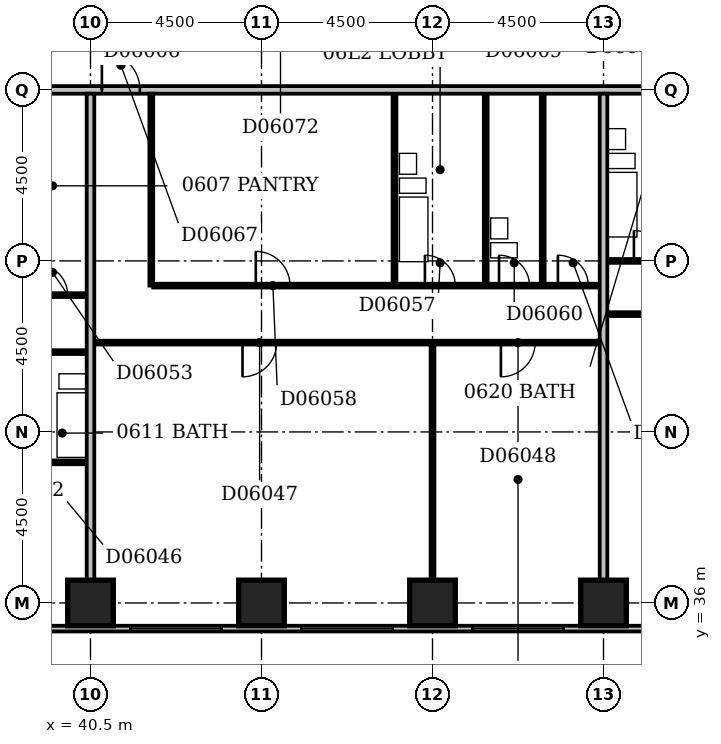
"""IFC4 building model, lengths in metres.
Left out: names, types, materials, properties, quantities, classifications, styles, units other than length and angle.
Written with IfcOpenShell. Run it as: python <this file> out.ifc"""

import sys

from ifc_helpers import new_model, si_unit, direction, frame, frame_2d, origin, origin_2d, place, context, subcontext, project, spatial, rectangle, extrude, element, fill, save


model = new_model("IFC4")
c1 = context("Model", 3, precision=1e-05, world=origin(), true_north=direction((0.0, 1.0)))
c2 = subcontext(c1, "Body", "Model", "MODEL_VIEW")
j1 = project(units=[si_unit("LENGTHUNIT", "METRE"), si_unit("PLANEANGLEUNIT", "RADIAN")], contexts=[c1])
p1 = place(None, origin())
s1 = spatial("IfcSite", under=j1, at=p1, CompositionType="ELEMENT")
p2 = place(p1, origin())
s2 = spatial("IfcBuilding", under=s1, at=p2, CompositionType="ELEMENT")
p3 = place(p2, frame((0.0, 0.0, 32.6)))
s3 = spatial("IfcBuildingStorey", under=s2, at=p3, CompositionType="ELEMENT", Elevation=32.6)
for number, where, z_axis, x_axis in (
    (1, (40.5, 36.0, -0.3), (0.0, 0.0, 1.0), (1.0, 0.0, 0.0)),
    (2, (45.0, 36.0, -0.3), (0.0, 0.0, 1.0), (1.0, 0.0, 0.0)),
    (3, (49.5, 36.0, -0.3), (0.0, 0.0, 1.0), (1.0, 0.0, 0.0)),
    (4, (54.0, 36.0, -0.3), (0.0, 0.0, 1.0), (1.0, 0.0, 0.0)),
):
    element("IfcColumn", number, at=place(p3, frame(where, z_axis=z_axis, x_axis=x_axis)), inside=s3, PredefinedType="COLUMN", context=c2, shape_type="SweptSolid", body=[
        extrude(rectangle(XDim=1.2, YDim=1.2, at=origin_2d()), origin(), (0.0, 0.0, 1.0), 3.6),
    ])
p4 = place(p3, frame((23.1, 35.325, 0.0), z_axis=(0.0, 0.0, 1.0), x_axis=(1.0, 0.0, 0.0)))
e5 = element("IfcWall", 5, at=p4, inside=s3, PredefinedType="STANDARD", context=c2, shape_type="SweptSolid", body=[
    extrude(rectangle(XDim=45.15, YDim=0.15, at=frame_2d((22.575, 0.0))), origin(), (0.0, 0.0, 1.0), 2.7),
])
p5 = place(p4, frame((0.45, 0.0, 0.6)))
e6 = element("IfcOpeningElement", 6, at=p5, cuts=e5, PredefinedType="OPENING", context=c2, shape_type="SweptSolid", body=[
    extrude(rectangle(XDim=2.4, YDim=1.8, at=frame_2d((1.2, 0.9))), frame((0.0, 0.087, 0.0), z_axis=(0.0, -1.0, 0.0), x_axis=(1.0, 0.0, 0.0)), (0.0, 0.0, 1.0), 0.174),
])
p6 = place(p4, frame((4.95, 0.0, 0.6)))
e7 = element("IfcOpeningElement", 7, at=p6, cuts=e5, PredefinedType="OPENING", context=c2, shape_type="SweptSolid", body=[
    extrude(rectangle(XDim=2.4, YDim=1.8, at=frame_2d((1.2, 0.9))), frame((0.0, 0.087, 0.0), z_axis=(0.0, -1.0, 0.0), x_axis=(1.0, 0.0, 0.0)), (0.0, 0.0, 1.0), 0.174),
])
p7 = place(p4, frame((10.583, 0.0, 0.6)))
e8 = element("IfcOpeningElement", 8, at=p7, cuts=e5, PredefinedType="OPENING", context=c2, shape_type="SweptSolid", body=[
    extrude(rectangle(XDim=1.5, YDim=1.8, at=frame_2d((0.75, 0.9))), frame((0.0, 0.087, 0.0), z_axis=(0.0, -1.0, 0.0), x_axis=(1.0, 0.0, 0.0)), (0.0, 0.0, 1.0), 0.174),
])
p8 = place(p4, frame((13.83, 0.0, 0.6)))
e9 = element("IfcOpeningElement", 9, at=p8, cuts=e5, PredefinedType="OPENING", context=c2, shape_type="SweptSolid", body=[
    extrude(rectangle(XDim=1.5, YDim=1.8, at=frame_2d((0.75, 0.9))), frame((0.0, 0.087, 0.0), z_axis=(0.0, -1.0, 0.0), x_axis=(1.0, 0.0, 0.0)), (0.0, 0.0, 1.0), 0.174),
])
p9 = place(p4, frame((18.45, 0.0, 0.6)))
e10 = element("IfcOpeningElement", 10, at=p9, cuts=e5, PredefinedType="OPENING", context=c2, shape_type="SweptSolid", body=[
    extrude(rectangle(XDim=2.4, YDim=1.8, at=frame_2d((1.2, 0.9))), frame((0.0, 0.087, 0.0), z_axis=(0.0, -1.0, 0.0), x_axis=(1.0, 0.0, 0.0)), (0.0, 0.0, 1.0), 0.174),
])
p10 = place(p4, frame((22.95, 0.0, 0.6)))
e11 = element("IfcOpeningElement", 11, at=p10, cuts=e5, PredefinedType="OPENING", context=c2, shape_type="SweptSolid", body=[
    extrude(rectangle(XDim=2.4, YDim=1.8, at=frame_2d((1.2, 0.9))), frame((0.0, 0.087, 0.0), z_axis=(0.0, -1.0, 0.0), x_axis=(1.0, 0.0, 0.0)), (0.0, 0.0, 1.0), 0.174),
])
p11 = place(p4, frame((27.45, 0.0, 0.6)))
e12 = element("IfcOpeningElement", 12, at=p11, cuts=e5, PredefinedType="OPENING", context=c2, shape_type="SweptSolid", body=[
    extrude(rectangle(XDim=2.4, YDim=1.8, at=frame_2d((1.2, 0.9))), frame((0.0, 0.087, 0.0), z_axis=(0.0, -1.0, 0.0), x_axis=(1.0, 0.0, 0.0)), (0.0, 0.0, 1.0), 0.174),
])
p12 = place(p4, frame((31.95, 0.0, 0.6)))
e13 = element("IfcOpeningElement", 13, at=p12, cuts=e5, PredefinedType="OPENING", context=c2, shape_type="SweptSolid", body=[
    extrude(rectangle(XDim=2.4, YDim=1.8, at=frame_2d((1.2, 0.9))), frame((0.0, 0.087, 0.0), z_axis=(0.0, -1.0, 0.0), x_axis=(1.0, 0.0, 0.0)), (0.0, 0.0, 1.0), 0.174),
])
p13 = place(p4, frame((36.297, 0.0, 0.6)))
e14 = element("IfcOpeningElement", 14, at=p13, cuts=e5, PredefinedType="OPENING", context=c2, shape_type="SweptSolid", body=[
    extrude(rectangle(XDim=2.1, YDim=1.8, at=frame_2d((1.05, 0.9))), frame((0.0, 0.087, 0.0), z_axis=(0.0, -1.0, 0.0), x_axis=(1.0, 0.0, 0.0)), (0.0, 0.0, 1.0), 0.174),
])
p14 = place(p4, frame((40.95, 0.0, 0.6)))
e15 = element("IfcOpeningElement", 15, at=p14, cuts=e5, PredefinedType="OPENING", context=c2, shape_type="SweptSolid", body=[
    extrude(rectangle(XDim=2.4, YDim=1.8, at=frame_2d((1.2, 0.9))), frame((0.0, 0.087, 0.0), z_axis=(0.0, -1.0, 0.0), x_axis=(1.0, 0.0, 0.0)), (0.0, 0.0, 1.0), 0.174),
])
p15 = place(p3, frame((40.5, 36.6, 0.0), z_axis=(0.0, 0.0, 1.0), x_axis=(0.0, 1.0, 0.0)))
e16 = element("IfcWall", 16, at=p15, inside=s3, PredefinedType="PARTITIONING", context=c2, shape_type="SweptSolid", body=[
    extrude(rectangle(XDim=12.8, YDim=0.2, at=frame_2d((6.4, 0.0))), origin(), (0.0, 0.0, 1.0), 3.3),
])
p16 = place(p3, frame((49.5, 36.6, 0.0), z_axis=(0.0, 0.0, 1.0), x_axis=(0.0, 1.0, 0.0)))
e17 = element("IfcWall", 17, at=p16, inside=s3, PredefinedType="PARTITIONING", context=c2, shape_type="SweptSolid", body=[
    extrude(rectangle(XDim=6.2, YDim=0.1, at=frame_2d((3.1, 0.0))), origin(), (0.0, 0.0, 1.0), 3.3),
])
p17 = place(p3, frame((54.0, 36.6, 0.0), z_axis=(0.0, 0.0, 1.0), x_axis=(0.0, 1.0, 0.0)))
e18 = element("IfcWall", 18, at=p17, inside=s3, PredefinedType="PARTITIONING", context=c2, shape_type="SweptSolid", body=[
    extrude(rectangle(XDim=12.8, YDim=0.2, at=frame_2d((6.4, 0.0))), origin(), (0.0, 0.0, 1.0), 2.6),
])
p18 = place(p3, frame((38.25, 39.7, 0.0), z_axis=(0.0, 0.0, 1.0), x_axis=(1.0, 0.0, 0.0)))
e19 = element("IfcWall", 19, at=p18, inside=s3, PredefinedType="PLUMBINGWALL", context=c2, shape_type="SweptSolid", body=[
    extrude(rectangle(XDim=2.15, YDim=0.1, at=frame_2d((1.075, 0.0))), origin(), (0.0, 0.0, 1.0), 3.3),
])
p19 = place(p3, frame((22.6, 42.6, 0.0), z_axis=(0.0, 0.0, 1.0), x_axis=(1.0, 0.0, 0.0)))
e20 = element("IfcWall", 20, at=p19, inside=s3, PredefinedType="PARTITIONING", context=c2, shape_type="SweptSolid", body=[
    extrude(rectangle(XDim=17.8, YDim=0.1, at=frame_2d((8.9, 0.0))), origin(), (0.0, 0.0, 1.0), 3.3),
])
p20 = place(p19, frame((3.9, 0.0, 0.0)))
e21 = element("IfcOpeningElement", 21, at=p20, cuts=e20, PredefinedType="OPENING", context=c2, shape_type="SweptSolid", body=[
    extrude(rectangle(XDim=0.9, YDim=2.1, at=frame_2d((0.45, 1.05))), frame((0.0, 0.062, 0.0), z_axis=(0.0, -1.0, 0.0), x_axis=(1.0, 0.0, 0.0)), (0.0, 0.0, 1.0), 0.124),
])
p21 = place(p19, frame((10.7, 0.0, 0.0)))
e22 = element("IfcOpeningElement", 22, at=p21, cuts=e20, PredefinedType="OPENING", context=c2, shape_type="SweptSolid", body=[
    extrude(rectangle(XDim=0.9, YDim=2.1, at=frame_2d((0.45, 1.05))), frame((0.0, 0.062, 0.0), z_axis=(0.0, -1.0, 0.0), x_axis=(1.0, 0.0, 0.0)), (0.0, 0.0, 1.0), 0.124),
])
p22 = place(p19, frame((14.05, 0.0, 0.0)))
e23 = element("IfcOpeningElement", 23, at=p22, cuts=e20, PredefinedType="OPENING", context=c2, shape_type="SweptSolid", body=[
    extrude(rectangle(XDim=0.9, YDim=2.1, at=frame_2d((0.45, 1.05))), frame((0.0, 0.062, 0.0), z_axis=(0.0, -1.0, 0.0), x_axis=(1.0, 0.0, 0.0)), (0.0, 0.0, 1.0), 0.124),
])
p23 = place(p3, frame((40.6, 42.85, 0.0), z_axis=(0.0, 0.0, 1.0), x_axis=(1.0, 0.0, 0.0)))
e24 = element("IfcWall", 24, at=p23, inside=s3, PredefinedType="PARTITIONING", context=c2, shape_type="SweptSolid", body=[
    extrude(rectangle(XDim=13.3, YDim=0.1, at=frame_2d((6.65, 0.0))), origin(), (0.0, 0.0, 1.0), 3.3),
])
p24 = place(p23, frame((3.9, 0.0, 0.0)))
e25 = element("IfcOpeningElement", 25, at=p24, cuts=e24, PredefinedType="OPENING", context=c2, shape_type="SweptSolid", body=[
    extrude(rectangle(XDim=0.9, YDim=2.1, at=frame_2d((0.45, 1.05))), frame((0.0, 0.062, 0.0), z_axis=(0.0, -1.0, 0.0), x_axis=(1.0, 0.0, 0.0)), (0.0, 0.0, 1.0), 0.124),
])
p25 = place(p23, frame((10.7, 0.0, 0.0)))
e26 = element("IfcOpeningElement", 26, at=p25, cuts=e24, PredefinedType="OPENING", context=c2, shape_type="SweptSolid", body=[
    extrude(rectangle(XDim=0.9, YDim=2.1, at=frame_2d((0.45, 1.05))), frame((0.0, 0.062, 0.0), z_axis=(0.0, -1.0, 0.0), x_axis=(1.0, 0.0, 0.0)), (0.0, 0.0, 1.0), 0.124),
])
p26 = place(p3, frame((54.1, 43.6, 0.0), z_axis=(0.0, 0.0, 1.0), x_axis=(1.0, 0.0, 0.0)))
e27 = element("IfcWall", 27, at=p26, inside=s3, PredefinedType="PARTITIONING", context=c2, shape_type="SweptSolid", body=[
    extrude(rectangle(XDim=8.8, YDim=0.1, at=frame_2d((4.4, 0.0))), origin(), (0.0, 0.0, 1.0), 3.3),
])
p27 = place(p26, frame((1.7, 0.0, 0.0)))
e28 = element("IfcOpeningElement", 28, at=p27, cuts=e27, PredefinedType="OPENING", context=c2, shape_type="SweptSolid", body=[
    extrude(rectangle(XDim=0.9, YDim=2.1, at=frame_2d((0.45, 1.05))), frame((0.0, 0.062, 0.0), z_axis=(0.0, -1.0, 0.0), x_axis=(1.0, 0.0, 0.0)), (0.0, 0.0, 1.0), 0.124),
])
p28 = place(p26, frame((6.2, 0.0, 0.0)))
e29 = element("IfcOpeningElement", 29, at=p28, cuts=e27, PredefinedType="OPENING", context=c2, shape_type="SweptSolid", body=[
    extrude(rectangle(XDim=0.9, YDim=2.1, at=frame_2d((0.45, 1.05))), frame((0.0, 0.062, 0.0), z_axis=(0.0, -1.0, 0.0), x_axis=(1.0, 0.0, 0.0)), (0.0, 0.0, 1.0), 0.124),
])
p29 = place(p3, frame((31.05, 44.1, 0.0), z_axis=(0.0, 0.0, 1.0), x_axis=(1.0, 0.0, 0.0)))
e30 = element("IfcWall", 30, at=p29, inside=s3, PredefinedType="PARTITIONING", context=c2, shape_type="SweptSolid", body=[
    extrude(rectangle(XDim=9.35, YDim=0.1, at=frame_2d((4.675, 0.0))), origin(), (0.0, 0.0, 1.0), 3.3),
])
p30 = place(p29, frame((0.75, 0.0, 0.0)))
e31 = element("IfcOpeningElement", 31, at=p30, cuts=e30, PredefinedType="OPENING", context=c2, shape_type="SweptSolid", body=[
    extrude(rectangle(XDim=0.8, YDim=2.1, at=frame_2d((0.4, 1.05))), frame((0.0, 0.062, 0.0), z_axis=(0.0, -1.0, 0.0), x_axis=(1.0, 0.0, 0.0)), (0.0, 0.0, 1.0), 0.124),
])
p31 = place(p29, frame((8.05, 0.0, 0.0)))
e32 = element("IfcOpeningElement", 32, at=p31, cuts=e30, PredefinedType="OPENING", context=c2, shape_type="SweptSolid", body=[
    extrude(rectangle(XDim=0.8, YDim=2.1, at=frame_2d((0.4, 1.05))), frame((0.0, 0.062, 0.0), z_axis=(0.0, -1.0, 0.0), x_axis=(1.0, 0.0, 0.0)), (0.0, 0.0, 1.0), 0.124),
])
p32 = place(p29, frame((4.25, 0.0, 0.0)))
e33 = element("IfcOpeningElement", 33, at=p32, cuts=e30, PredefinedType="OPENING", context=c2, shape_type="SweptSolid", body=[
    extrude(rectangle(XDim=0.8, YDim=2.1, at=frame_2d((0.4, 1.05))), frame((0.0, 0.062, 0.0), z_axis=(0.0, -1.0, 0.0), x_axis=(1.0, 0.0, 0.0)), (0.0, 0.0, 1.0), 0.124),
])
p33 = place(p29, frame((6.05, 0.0, 0.0)))
e34 = element("IfcOpeningElement", 34, at=p33, cuts=e30, PredefinedType="OPENING", context=c2, shape_type="SweptSolid", body=[
    extrude(rectangle(XDim=0.8, YDim=2.1, at=frame_2d((0.4, 1.05))), frame((0.0, 0.062, 0.0), z_axis=(0.0, -1.0, 0.0), x_axis=(1.0, 0.0, 0.0)), (0.0, 0.0, 1.0), 0.124),
])
p34 = place(p29, frame((2.7, 0.0, 0.0)))
e35 = element("IfcOpeningElement", 35, at=p34, cuts=e30, PredefinedType="OPENING", context=c2, shape_type="SweptSolid", body=[
    extrude(rectangle(XDim=0.8, YDim=2.1, at=frame_2d((0.4, 1.05))), frame((0.0, 0.062, 0.0), z_axis=(0.0, -1.0, 0.0), x_axis=(1.0, 0.0, 0.0)), (0.0, 0.0, 1.0), 0.124),
])
p35 = place(p3, frame((42.1, 44.35, 0.0), z_axis=(0.0, 0.0, 1.0), x_axis=(0.0, 1.0, 0.0)))
e36 = element("IfcWall", 36, at=p35, inside=s3, PredefinedType="PARTITIONING", context=c2, shape_type="SweptSolid", body=[
    extrude(rectangle(XDim=5.05, YDim=0.1, at=frame_2d((2.525, 0.0))), origin(), (0.0, 0.0, 1.0), 3.3),
])
p36 = place(p3, frame((42.15, 44.35, 0.0), z_axis=(0.0, 0.0, 1.0), x_axis=(1.0, 0.0, 0.0)))
e37 = element("IfcWall", 37, at=p36, inside=s3, PredefinedType="PARTITIONING", context=c2, shape_type="SweptSolid", body=[
    extrude(rectangle(XDim=11.75, YDim=0.1, at=frame_2d((5.875, 0.0))), origin(), (0.0, 0.0, 1.0), 3.3),
])
p37 = place(p36, frame((7.15, 0.0, 0.0)))
e38 = element("IfcOpeningElement", 38, at=p37, cuts=e37, PredefinedType="OPENING", context=c2, shape_type="SweptSolid", body=[
    extrude(rectangle(XDim=0.8, YDim=2.1, at=frame_2d((0.4, 1.05))), frame((0.0, 0.062, 0.0), z_axis=(0.0, -1.0, 0.0), x_axis=(1.0, 0.0, 0.0)), (0.0, 0.0, 1.0), 0.124),
])
p38 = place(p36, frame((2.7, 0.0, 0.0)))
e39 = element("IfcOpeningElement", 39, at=p38, cuts=e37, PredefinedType="OPENING", context=c2, shape_type="SweptSolid", body=[
    extrude(rectangle(XDim=0.9, YDim=2.1, at=frame_2d((0.45, 1.05))), frame((0.0, 0.062, 0.0), z_axis=(0.0, -1.0, 0.0), x_axis=(1.0, 0.0, 0.0)), (0.0, 0.0, 1.0), 0.124),
])
p39 = place(p36, frame((10.65, 0.0, 0.0)))
e40 = element("IfcOpeningElement", 40, at=p39, cuts=e37, PredefinedType="OPENING", context=c2, shape_type="SweptSolid", body=[
    extrude(rectangle(XDim=0.8, YDim=2.1, at=frame_2d((0.4, 1.05))), frame((0.0, 0.062, 0.0), z_axis=(0.0, -1.0, 0.0), x_axis=(1.0, 0.0, 0.0)), (0.0, 0.0, 1.0), 0.124),
])
p40 = place(p36, frame((9.1, 0.0, 0.0)))
e41 = element("IfcOpeningElement", 41, at=p40, cuts=e37, PredefinedType="OPENING", context=c2, shape_type="SweptSolid", body=[
    extrude(rectangle(XDim=0.8, YDim=2.1, at=frame_2d((0.4, 1.05))), frame((0.0, 0.062, 0.0), z_axis=(0.0, -1.0, 0.0), x_axis=(1.0, 0.0, 0.0)), (0.0, 0.0, 1.0), 0.124),
])
for number, where, z_axis, x_axis in (
    (42, (48.5, 44.4, 0.0), (0.0, 0.0, 1.0), (0.0, 1.0, 0.0)),
    (43, (50.9, 44.4, 0.0), (0.0, 0.0, 1.0), (0.0, 1.0, 0.0)),
    (44, (52.4, 44.4, 0.0), (0.0, 0.0, 1.0), (0.0, 1.0, 0.0)),
):
    element("IfcWall", number, at=place(p3, frame(where, z_axis=z_axis, x_axis=x_axis)), inside=s3, PredefinedType="PLUMBINGWALL", context=c2, shape_type="SweptSolid", body=[
        extrude(rectangle(XDim=5.0, YDim=0.1, at=frame_2d((2.5, 0.0))), origin(), (0.0, 0.0, 1.0), 3.3),
    ])
p41 = place(p3, frame((54.1, 45.0, 0.0), z_axis=(0.0, 0.0, 1.0), x_axis=(1.0, 0.0, 0.0)))
e45 = element("IfcWall", 45, at=p41, inside=s3, PredefinedType="PARTITIONING", context=c2, shape_type="SweptSolid", body=[
    extrude(rectangle(XDim=2.25, YDim=0.1, at=frame_2d((1.125, 0.0))), origin(), (0.0, 0.0, 1.0), 3.3),
])
p42 = place(p41, frame((0.7, 0.0, 0.0)))
e46 = element("IfcOpeningElement", 46, at=p42, cuts=e45, PredefinedType="OPENING", context=c2, shape_type="SweptSolid", body=[
    extrude(rectangle(XDim=0.8, YDim=2.1, at=frame_2d((0.4, 1.05))), frame((0.0, 0.062, 0.0), z_axis=(0.0, -1.0, 0.0), x_axis=(1.0, 0.0, 0.0)), (0.0, 0.0, 1.0), 0.124),
])
p43 = place(p3, frame((9.1, 49.5, 0.0), z_axis=(0.0, 0.0, 1.0), x_axis=(1.0, 0.0, 0.0)))
e47 = element("IfcWall", 47, at=p43, inside=s3, PredefinedType="PARTITIONING", context=c2, shape_type="SweptSolid", body=[
    extrude(rectangle(XDim=57.8, YDim=0.2, at=frame_2d((28.9, 0.0))), origin(), (0.0, 0.0, 1.0), 3.3),
])
p44 = place(p43, frame((20.6, 0.0, 0.0)))
e48 = element("IfcOpeningElement", 48, at=p44, cuts=e47, PredefinedType="OPENING", context=c2, shape_type="SweptSolid", body=[
    extrude(rectangle(XDim=1.0, YDim=2.1, at=frame_2d((0.5, 1.05))), frame((0.0, 0.112, 0.0), z_axis=(0.0, -1.0, 0.0), x_axis=(1.0, 0.0, 0.0)), (0.0, 0.0, 1.0), 0.224),
])
p45 = place(p43, frame((31.7, 0.0, 0.0)))
e49 = element("IfcOpeningElement", 49, at=p45, cuts=e47, PredefinedType="OPENING", context=c2, shape_type="SweptSolid", body=[
    extrude(rectangle(XDim=1.0, YDim=2.1, at=frame_2d((0.5, 1.05))), frame((0.0, 0.112, 0.0), z_axis=(0.0, -1.0, 0.0), x_axis=(1.0, 0.0, 0.0)), (0.0, 0.0, 1.0), 0.224),
])
p46 = place(p43, frame((47.6, 0.0, 0.0)))
e50 = element("IfcOpeningElement", 50, at=p46, cuts=e47, PredefinedType="OPENING", context=c2, shape_type="SweptSolid", body=[
    extrude(rectangle(XDim=1.0, YDim=2.1, at=frame_2d((0.5, 1.05))), frame((0.0, 0.112, 0.0), z_axis=(0.0, -1.0, 0.0), x_axis=(1.0, 0.0, 0.0)), (0.0, 0.0, 1.0), 0.224),
])
p47 = place(p43, frame((54.15, 0.0, 0.0)))
e51 = element("IfcOpeningElement", 51, at=p47, cuts=e47, PredefinedType="OPENING", context=c2, shape_type="SweptSolid", body=[
    extrude(rectangle(XDim=1.0, YDim=2.1, at=frame_2d((0.5, 1.05))), frame((0.0, 0.112, 0.0), z_axis=(0.0, -1.0, 0.0), x_axis=(1.0, 0.0, 0.0)), (0.0, 0.0, 1.0), 0.224),
])
p48 = place(p43, frame((10.65, 0.0, 0.0)))
e52 = element("IfcOpeningElement", 52, at=p48, cuts=e47, PredefinedType="OPENING", context=c2, shape_type="SweptSolid", body=[
    extrude(rectangle(XDim=0.9, YDim=2.1, at=frame_2d((0.45, 1.05))), frame((0.0, 0.112, 0.0), z_axis=(0.0, -1.0, 0.0), x_axis=(1.0, 0.0, 0.0)), (0.0, 0.0, 1.0), 0.224),
])
p49 = place(p9, origin())
e53 = element("IfcWindow", 53, at=p49, inside=s3, PartitioningType="SINGLE_PANEL", PredefinedType="WINDOW", context=c2, shape_type="SweptSolid", body=[
    extrude(rectangle(XDim=2.4, YDim=1.8, at=frame_2d((1.2, 0.9))), frame((0.0, 0.03, 0.0), z_axis=(0.0, -1.0, 0.0), x_axis=(1.0, 0.0, 0.0)), (0.0, 0.0, 1.0), 0.06),
])
fill(e10, e53)
p50 = place(p10, origin())
e54 = element("IfcWindow", 54, at=p50, inside=s3, PartitioningType="SINGLE_PANEL", PredefinedType="WINDOW", context=c2, shape_type="SweptSolid", body=[
    extrude(rectangle(XDim=2.4, YDim=1.8, at=frame_2d((1.2, 0.9))), frame((0.0, 0.03, 0.0), z_axis=(0.0, -1.0, 0.0), x_axis=(1.0, 0.0, 0.0)), (0.0, 0.0, 1.0), 0.06),
])
fill(e11, e54)
p51 = place(p11, origin())
e55 = element("IfcWindow", 55, at=p51, inside=s3, PartitioningType="SINGLE_PANEL", PredefinedType="WINDOW", context=c2, shape_type="SweptSolid", body=[
    extrude(rectangle(XDim=2.4, YDim=1.8, at=frame_2d((1.2, 0.9))), frame((0.0, 0.03, 0.0), z_axis=(0.0, -1.0, 0.0), x_axis=(1.0, 0.0, 0.0)), (0.0, 0.0, 1.0), 0.06),
])
fill(e12, e55)
p52 = place(p24, frame((0.9, 0.0, 0.0), z_axis=(0.0, 0.0, 1.0), x_axis=(-1.0, 0.0, 0.0)))
e56 = element("IfcDoor", 56, at=p52, inside=s3, OperationType="SINGLE_SWING_RIGHT", PredefinedType="DOOR", context=c2, shape_type="SweptSolid", body=[
    extrude(rectangle(XDim=0.9, YDim=2.1, at=frame_2d((0.45, 1.05))), frame((0.0, 0.025, 0.0), z_axis=(0.0, -1.0, 0.0), x_axis=(1.0, 0.0, 0.0)), (0.0, 0.0, 1.0), 0.05),
])
fill(e25, e56)
p53 = place(p25, frame((0.9, 0.0, 0.0), z_axis=(0.0, 0.0, 1.0), x_axis=(-1.0, 0.0, 0.0)))
e57 = element("IfcDoor", 57, at=p53, inside=s3, OperationType="SINGLE_SWING_RIGHT", PredefinedType="DOOR", context=c2, shape_type="SweptSolid", body=[
    extrude(rectangle(XDim=0.9, YDim=2.1, at=frame_2d((0.45, 1.05))), frame((0.0, 0.025, 0.0), z_axis=(0.0, -1.0, 0.0), x_axis=(1.0, 0.0, 0.0)), (0.0, 0.0, 1.0), 0.05),
])
fill(e26, e57)
p54 = place(p31, origin())
e58 = element("IfcDoor", 58, at=p54, inside=s3, OperationType="SINGLE_SWING_LEFT", PredefinedType="DOOR", context=c2, shape_type="SweptSolid", body=[
    extrude(rectangle(XDim=0.8, YDim=2.1, at=frame_2d((0.4, 1.05))), frame((0.0, 0.025, 0.0), z_axis=(0.0, -1.0, 0.0), x_axis=(1.0, 0.0, 0.0)), (0.0, 0.0, 1.0), 0.05),
])
fill(e32, e58)
p55 = place(p37, origin())
e59 = element("IfcDoor", 59, at=p55, inside=s3, OperationType="SINGLE_SWING_LEFT", PredefinedType="DOOR", context=c2, shape_type="SweptSolid", body=[
    extrude(rectangle(XDim=0.8, YDim=2.1, at=frame_2d((0.4, 1.05))), frame((0.0, 0.025, 0.0), z_axis=(0.0, -1.0, 0.0), x_axis=(1.0, 0.0, 0.0)), (0.0, 0.0, 1.0), 0.05),
])
fill(e38, e59)
p56 = place(p38, origin())
e60 = element("IfcDoor", 60, at=p56, inside=s3, OperationType="SINGLE_SWING_LEFT", PredefinedType="DOOR", context=c2, shape_type="SweptSolid", body=[
    extrude(rectangle(XDim=0.9, YDim=2.1, at=frame_2d((0.45, 1.05))), frame((0.0, 0.025, 0.0), z_axis=(0.0, -1.0, 0.0), x_axis=(1.0, 0.0, 0.0)), (0.0, 0.0, 1.0), 0.05),
])
fill(e39, e60)
p57 = place(p39, origin())
e61 = element("IfcDoor", 61, at=p57, inside=s3, OperationType="SINGLE_SWING_LEFT", PredefinedType="DOOR", context=c2, shape_type="SweptSolid", body=[
    extrude(rectangle(XDim=0.8, YDim=2.1, at=frame_2d((0.4, 1.05))), frame((0.0, 0.025, 0.0), z_axis=(0.0, -1.0, 0.0), x_axis=(1.0, 0.0, 0.0)), (0.0, 0.0, 1.0), 0.05),
])
fill(e40, e61)
p58 = place(p40, origin())
e62 = element("IfcDoor", 62, at=p58, inside=s3, OperationType="SINGLE_SWING_LEFT", PredefinedType="DOOR", context=c2, shape_type="SweptSolid", body=[
    extrude(rectangle(XDim=0.8, YDim=2.1, at=frame_2d((0.4, 1.05))), frame((0.0, 0.025, 0.0), z_axis=(0.0, -1.0, 0.0), x_axis=(1.0, 0.0, 0.0)), (0.0, 0.0, 1.0), 0.05),
])
fill(e41, e62)
p59 = place(p42, origin())
e63 = element("IfcDoor", 63, at=p59, inside=s3, OperationType="SINGLE_SWING_LEFT", PredefinedType="DOOR", context=c2, shape_type="SweptSolid", body=[
    extrude(rectangle(XDim=0.8, YDim=2.1, at=frame_2d((0.4, 1.05))), frame((0.0, 0.025, 0.0), z_axis=(0.0, -1.0, 0.0), x_axis=(1.0, 0.0, 0.0)), (0.0, 0.0, 1.0), 0.05),
])
fill(e46, e63)
p60 = place(p45, origin())
e64 = element("IfcDoor", 64, at=p60, inside=s3, OperationType="SINGLE_SWING_LEFT", PredefinedType="DOOR", context=c2, shape_type="SweptSolid", body=[
    extrude(rectangle(XDim=1.0, YDim=2.1, at=frame_2d((0.5, 1.05))), frame((0.0, 0.025, 0.0), z_axis=(0.0, -1.0, 0.0), x_axis=(1.0, 0.0, 0.0)), (0.0, 0.0, 1.0), 0.05),
])
fill(e49, e64)
save(model, sys.argv[1])
